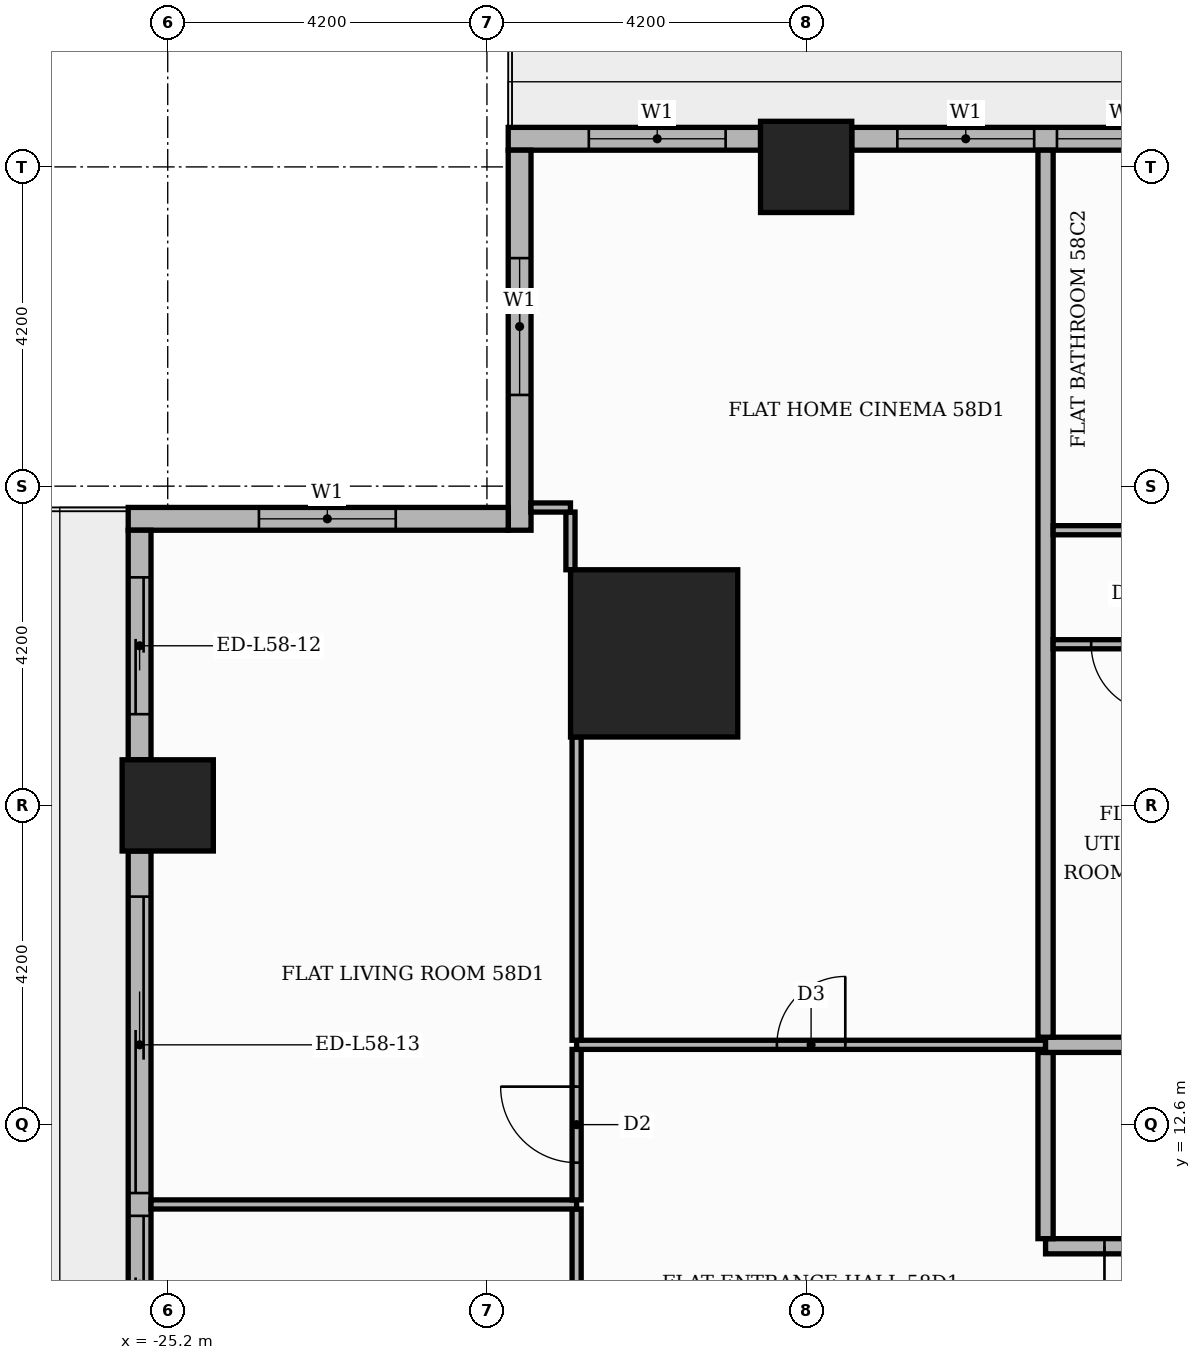
"""IFC4 building model, lengths in metres.
Left out: names, types, materials, properties, quantities, classifications, styles, units other than length and angle.
Written with IfcOpenShell. Run it as: python <this file> out.ifc"""

import sys

from ifc_helpers import new_model, si_unit, direction, frame, frame_2d, origin, origin_2d, place, context, subcontext, project, spatial, rectangle, extrude, element, fill, save


model = new_model("IFC4")
c1 = context("Model", 3, precision=1e-05, world=origin(), true_north=direction((0.0, 1.0)))
c2 = subcontext(c1, "Body", "Model", "MODEL_VIEW")
j1 = project(units=[si_unit("LENGTHUNIT", "METRE"), si_unit("PLANEANGLEUNIT", "RADIAN")], contexts=[c1])
p1 = place(None, origin())
s1 = spatial("IfcSite", under=j1, at=p1, CompositionType="ELEMENT")
p2 = place(p1, origin())
s2 = spatial("IfcBuilding", under=s1, at=p2, CompositionType="ELEMENT")
p3 = place(p2, frame((0.0, 0.0, 244.5)))
s3 = spatial("IfcBuildingStorey", under=s2, at=p3, CompositionType="ELEMENT", Elevation=244.5)
p4 = place(p3, frame((-18.8, 18.8, 0.0), z_axis=(0.0, 0.0, 1.0), x_axis=(1.0, 0.0, 0.0)))
e1 = element("IfcColumn", 1, at=p4, inside=s3, PredefinedType="COLUMN", context=c2, shape_type="SweptSolid", body=[
    extrude(rectangle(XDim=2.2, YDim=2.2, at=origin_2d()), origin(), (0.0, 0.0, 1.0), 3.9),
])
for number, where, z_axis, x_axis in (
    (2, (-16.8, 25.2, 0.0), (0.0, 0.0, 1.0), (1.0, 0.0, 0.0)),
    (3, (-25.2, 16.8, 0.0), (0.0, 0.0, 1.0), (1.0, 0.0, 0.0)),
):
    element("IfcColumn", number, at=place(p3, frame(where, z_axis=z_axis, x_axis=x_axis)), inside=s3, PredefinedType="COLUMN", context=c2, shape_type="SweptSolid", body=[
        extrude(rectangle(XDim=1.2, YDim=1.2, at=origin_2d()), origin(), (0.0, 0.0, 1.0), 3.9),
    ])
p5 = place(p3, frame((-9.0, 25.57, 0.0), z_axis=(0.0, 0.0, 1.0), x_axis=(-1.0, 0.0, 0.0)))
e4 = element("IfcWall", 4, at=p5, inside=s3, PredefinedType="STANDARD", context=c2, shape_type="SweptSolid", body=[
    extrude(rectangle(XDim=7.2, YDim=0.3, at=frame_2d((3.6, 0.0))), origin(), (0.0, 0.0, 1.0), 3.48),
])
p6 = place(p5, frame((0.6, 0.0, 0.9)))
e5 = element("IfcOpeningElement", 5, at=p6, cuts=e4, PredefinedType="OPENING", context=c2, shape_type="SweptSolid", body=[
    extrude(rectangle(XDim=1.8, YDim=2.1, at=frame_2d((0.9, 1.05))), frame((0.0, 0.16, 0.0), z_axis=(0.0, -1.0, 0.0), x_axis=(1.0, 0.0, 0.0)), (0.0, 0.0, 1.0), 0.32),
])
p7 = place(p5, frame((2.7, 0.0, 0.9)))
e6 = element("IfcOpeningElement", 6, at=p7, cuts=e4, PredefinedType="OPENING", context=c2, shape_type="SweptSolid", body=[
    extrude(rectangle(XDim=1.8, YDim=2.1, at=frame_2d((0.9, 1.05))), frame((0.0, 0.16, 0.0), z_axis=(0.0, -1.0, 0.0), x_axis=(1.0, 0.0, 0.0)), (0.0, 0.0, 1.0), 0.32),
])
p8 = place(p5, frame((4.8, 0.0, 0.9)))
e7 = element("IfcOpeningElement", 7, at=p8, cuts=e4, PredefinedType="OPENING", context=c2, shape_type="SweptSolid", body=[
    extrude(rectangle(XDim=1.8, YDim=2.1, at=frame_2d((0.9, 1.05))), frame((0.0, 0.16, 0.0), z_axis=(0.0, -1.0, 0.0), x_axis=(1.0, 0.0, 0.0)), (0.0, 0.0, 1.0), 0.32),
])
p9 = place(p3, frame((-17.4, 25.57, 0.0), z_axis=(0.0, 0.0, 1.0), x_axis=(-1.0, 0.0, 0.0)))
e8 = element("IfcWall", 8, at=p9, inside=s3, PredefinedType="STANDARD", context=c2, shape_type="SweptSolid", body=[
    extrude(rectangle(XDim=3.32, YDim=0.3, at=frame_2d((1.66, 0.0))), origin(), (0.0, 0.0, 1.0), 3.48),
])
p10 = place(p9, frame((0.459, 0.0, 0.9)))
e9 = element("IfcOpeningElement", 9, at=p10, cuts=e8, PredefinedType="OPENING", context=c2, shape_type="SweptSolid", body=[
    extrude(rectangle(XDim=1.8, YDim=2.1, at=frame_2d((0.9, 1.05))), frame((0.0, 0.16, 0.0), z_axis=(0.0, -1.0, 0.0), x_axis=(1.0, 0.0, 0.0)), (0.0, 0.0, 1.0), 0.32),
])
p11 = place(p3, frame((-20.57, 25.42, 0.0), z_axis=(0.0, 0.0, 1.0), x_axis=(0.0, -1.0, 0.0)))
e10 = element("IfcWall", 10, at=p11, inside=s3, PredefinedType="STANDARD", context=c2, shape_type="SweptSolid", body=[
    extrude(rectangle(XDim=5.0, YDim=0.3, at=frame_2d((2.5, 0.0))), origin(), (0.0, 0.0, 1.0), 3.48),
])
p12 = place(p11, frame((1.42, 0.0, 0.9)))
e11 = element("IfcOpeningElement", 11, at=p12, cuts=e10, PredefinedType="OPENING", context=c2, shape_type="SweptSolid", body=[
    extrude(rectangle(XDim=1.8, YDim=2.1, at=frame_2d((0.9, 1.05))), frame((0.0, 0.16, 0.0), z_axis=(0.0, -1.0, 0.0), x_axis=(1.0, 0.0, 0.0)), (0.0, 0.0, 1.0), 0.32),
])
p13 = place(p3, frame((-20.72, 20.57, 0.0), z_axis=(0.0, 0.0, 1.0), x_axis=(-1.0, 0.0, 0.0)))
e12 = element("IfcWall", 12, at=p13, inside=s3, PredefinedType="STANDARD", context=c2, shape_type="SweptSolid", body=[
    extrude(rectangle(XDim=5.0, YDim=0.3, at=frame_2d((2.5, 0.0))), origin(), (0.0, 0.0, 1.0), 3.48),
])
p14 = place(p13, frame((1.48, 0.0, 0.9)))
e13 = element("IfcOpeningElement", 13, at=p14, cuts=e12, PredefinedType="OPENING", context=c2, shape_type="SweptSolid", body=[
    extrude(rectangle(XDim=1.8, YDim=2.1, at=frame_2d((0.9, 1.05))), frame((0.0, 0.16, 0.0), z_axis=(0.0, -1.0, 0.0), x_axis=(1.0, 0.0, 0.0)), (0.0, 0.0, 1.0), 0.32),
])
p15 = place(p3, frame((-25.57, 20.42, 0.0), z_axis=(0.0, 0.0, 1.0), x_axis=(0.0, -1.0, 0.0)))
e14 = element("IfcWall", 14, at=p15, inside=s3, PredefinedType="STANDARD", context=c2, shape_type="SweptSolid", body=[
    extrude(rectangle(XDim=3.02, YDim=0.3, at=frame_2d((1.51, 0.0))), origin(), (0.0, 0.0, 1.0), 3.48),
])
p16 = place(p15, frame((0.62, 0.0, 0.0)))
e15 = element("IfcOpeningElement", 15, at=p16, cuts=e14, PredefinedType="OPENING", context=c2, shape_type="SweptSolid", body=[
    extrude(rectangle(XDim=1.8, YDim=2.4, at=frame_2d((0.9, 1.2))), frame((0.0, 0.16, 0.0), z_axis=(0.0, -1.0, 0.0), x_axis=(1.0, 0.0, 0.0)), (0.0, 0.0, 1.0), 0.32),
])
p17 = place(p3, frame((-25.57, 16.2, 0.0), z_axis=(0.0, 0.0, 1.0), x_axis=(0.0, -1.0, 0.0)))
e16 = element("IfcWall", 16, at=p17, inside=s3, PredefinedType="STANDARD", context=c2, shape_type="SweptSolid", body=[
    extrude(rectangle(XDim=7.2, YDim=0.3, at=frame_2d((3.6, 0.0))), origin(), (0.0, 0.0, 1.0), 3.48),
])
p18 = place(p17, frame((0.6, 0.0, 0.0)))
e17 = element("IfcOpeningElement", 17, at=p18, cuts=e16, PredefinedType="OPENING", context=c2, shape_type="SweptSolid", body=[
    extrude(rectangle(XDim=3.9, YDim=2.4, at=frame_2d((1.95, 1.2))), frame((0.0, 0.16, 0.0), z_axis=(0.0, -1.0, 0.0), x_axis=(1.0, 0.0, 0.0)), (0.0, 0.0, 1.0), 0.32),
])
p19 = place(p17, frame((4.8, 0.0, 0.0)))
e18 = element("IfcOpeningElement", 18, at=p19, cuts=e16, PredefinedType="OPENING", context=c2, shape_type="SweptSolid", body=[
    extrude(rectangle(XDim=1.8, YDim=2.4, at=frame_2d((0.9, 1.2))), frame((0.0, 0.16, 0.0), z_axis=(0.0, -1.0, 0.0), x_axis=(1.0, 0.0, 0.0)), (0.0, 0.0, 1.0), 0.32),
])
p20 = place(p3, frame((-19.82, 5.31, 0.0), z_axis=(0.0, 0.0, 1.0), x_axis=(0.0, 1.0, 0.0)))
e19 = element("IfcWall", 19, at=p20, inside=s3, PredefinedType="PARTITIONING", context=c2, shape_type="SweptSolid", body=[
    extrude(rectangle(XDim=6.18, YDim=0.12, at=frame_2d((3.09, 0.0))), origin(), (0.0, 0.0, 1.0), 3.48),
])
p21 = place(p20, frame((2.64, 0.0, 0.0)))
e20 = element("IfcOpeningElement", 20, at=p21, cuts=e19, PredefinedType="OPENING", context=c2, shape_type="SweptSolid", body=[
    extrude(rectangle(XDim=0.9, YDim=2.1, at=frame_2d((0.45, 1.05))), frame((0.0, 0.07, 0.0), z_axis=(0.0, -1.0, 0.0), x_axis=(1.0, 0.0, 0.0)), (0.0, 0.0, 1.0), 0.14),
])
p22 = place(p3, frame((-13.65, 11.0, 0.0), z_axis=(0.0, 0.0, 1.0), x_axis=(1.0, 0.0, 0.0)))
e21 = element("IfcWall", 21, at=p22, inside=s3, PredefinedType="PARTITIONING", context=c2, shape_type="SweptSolid", body=[
    extrude(rectangle(XDim=2.65, YDim=0.2, at=frame_2d((1.325, 0.0))), origin(), (0.0, 0.0, 1.0), 3.48),
])
p23 = place(p22, frame((0.775, 0.0, 0.0)))
e22 = element("IfcOpeningElement", 22, at=p23, cuts=e21, PredefinedType="OPENING", context=c2, shape_type="SweptSolid", body=[
    extrude(rectangle(XDim=1.1, YDim=2.4, at=frame_2d((0.55, 1.2))), frame((0.0, 0.11, 0.0), z_axis=(0.0, -1.0, 0.0), x_axis=(1.0, 0.0, 0.0)), (0.0, 0.0, 1.0), 0.22),
])
p24 = place(p3, frame((-13.65, 11.1, 0.0), z_axis=(0.0, 0.0, 1.0), x_axis=(0.0, 1.0, 0.0)))
e23 = element("IfcWall", 23, at=p24, inside=s3, PredefinedType="PARTITIONING", context=c2, shape_type="SweptSolid", body=[
    extrude(rectangle(XDim=2.45, YDim=0.2, at=frame_2d((1.225, 0.0))), origin(), (0.0, 0.0, 1.0), 3.48),
])
p25 = place(p3, frame((-25.42, 11.55, 0.0), z_axis=(0.0, 0.0, 1.0), x_axis=(1.0, 0.0, 0.0)))
e24 = element("IfcWall", 24, at=p25, inside=s3, PredefinedType="PARTITIONING", context=c2, shape_type="SweptSolid", body=[
    extrude(rectangle(XDim=5.6, YDim=0.12, at=frame_2d((2.8, 0.0))), origin(), (0.0, 0.0, 1.0), 3.48),
])
p26 = place(p3, frame((-19.82, 11.61, 0.0), z_axis=(0.0, 0.0, 1.0), x_axis=(0.0, 1.0, 0.0)))
e25 = element("IfcWall", 25, at=p26, inside=s3, PredefinedType="PARTITIONING", context=c2, shape_type="SweptSolid", body=[
    extrude(rectangle(XDim=1.98, YDim=0.12, at=frame_2d((0.99, 0.0))), origin(), (0.0, 0.0, 1.0), 3.48),
])
p27 = place(p26, frame((0.49, 0.0, 0.0)))
e26 = element("IfcOpeningElement", 26, at=p27, cuts=e25, PredefinedType="OPENING", context=c2, shape_type="SweptSolid", body=[
    extrude(rectangle(XDim=1.0, YDim=2.1, at=frame_2d((0.5, 1.05))), frame((0.0, 0.07, 0.0), z_axis=(0.0, -1.0, 0.0), x_axis=(1.0, 0.0, 0.0)), (0.0, 0.0, 1.0), 0.14),
])
p28 = place(p3, frame((-19.82, 13.65, 0.0), z_axis=(0.0, 0.0, 1.0), x_axis=(1.0, 0.0, 0.0)))
e27 = element("IfcWall", 27, at=p28, inside=s3, PredefinedType="PARTITIONING", context=c2, shape_type="SweptSolid", body=[
    extrude(rectangle(XDim=6.17, YDim=0.12, at=frame_2d((3.085, 0.0))), origin(), (0.0, 0.0, 1.0), 3.48),
])
p29 = place(p28, frame((2.635, 0.0, 0.0)))
e28 = element("IfcOpeningElement", 28, at=p29, cuts=e27, PredefinedType="OPENING", context=c2, shape_type="SweptSolid", body=[
    extrude(rectangle(XDim=0.9, YDim=2.1, at=frame_2d((0.45, 1.05))), frame((0.0, 0.07, 0.0), z_axis=(0.0, -1.0, 0.0), x_axis=(1.0, 0.0, 0.0)), (0.0, 0.0, 1.0), 0.14),
])
p30 = place(p3, frame((-13.65, 13.65, 0.0), z_axis=(0.0, 0.0, 1.0), x_axis=(1.0, 0.0, 0.0)))
e29 = element("IfcWall", 29, at=p30, inside=s3, PredefinedType="PARTITIONING", context=c2, shape_type="SweptSolid", body=[
    extrude(rectangle(XDim=39.07, YDim=0.2, at=frame_2d((19.535, 0.0))), origin(), (0.0, 0.0, 1.0), 3.48),
])
p31 = place(p30, frame((24.65, 0.0, 0.0)))
e30 = element("IfcOpeningElement", 30, at=p31, cuts=e29, PredefinedType="OPENING", context=c2, shape_type="SweptSolid", body=[
    extrude(rectangle(XDim=1.1, YDim=2.4, at=frame_2d((0.55, 1.2))), frame((0.0, 0.11, 0.0), z_axis=(0.0, -1.0, 0.0), x_axis=(1.0, 0.0, 0.0)), (0.0, 0.0, 1.0), 0.22),
])
p32 = place(p30, frame((12.05, 0.0, 0.0)))
e31 = element("IfcOpeningElement", 31, at=p32, cuts=e29, PredefinedType="OPENING", context=c2, shape_type="SweptSolid", body=[
    extrude(rectangle(XDim=1.1, YDim=2.4, at=frame_2d((0.55, 1.2))), frame((0.0, 0.11, 0.0), z_axis=(0.0, -1.0, 0.0), x_axis=(1.0, 0.0, 0.0)), (0.0, 0.0, 1.0), 0.22),
])
p33 = place(p3, frame((-19.82, 13.71, 0.0), z_axis=(0.0, 0.0, 1.0), x_axis=(0.0, 1.0, 0.0)))
e32 = element("IfcWall", 32, at=p33, inside=s3, PredefinedType="PARTITIONING", context=c2, shape_type="SweptSolid", body=[
    extrude(rectangle(XDim=3.99, YDim=0.12, at=frame_2d((1.995, 0.0))), origin(), (0.0, 0.0, 1.0), 3.48),
])
p34 = place(p3, frame((-13.65, 13.75, 0.0), z_axis=(0.0, 0.0, 1.0), x_axis=(0.0, 1.0, 0.0)))
e33 = element("IfcWall", 33, at=p34, inside=s3, PredefinedType="PARTITIONING", context=c2, shape_type="SweptSolid", body=[
    extrude(rectangle(XDim=11.67, YDim=0.2, at=frame_2d((5.835, 0.0))), origin(), (0.0, 0.0, 1.0), 3.48),
])
p35 = place(p3, frame((-13.55, 18.92, 0.0), z_axis=(0.0, 0.0, 1.0), x_axis=(1.0, 0.0, 0.0)))
e34 = element("IfcWall", 34, at=p35, inside=s3, PredefinedType="PARTITIONING", context=c2, shape_type="SweptSolid", body=[
    extrude(rectangle(XDim=10.4, YDim=0.12, at=frame_2d((5.2, 0.0))), origin(), (0.0, 0.0, 1.0), 3.48),
])
p36 = place(p35, frame((6.8, 0.0, 0.0)))
e35 = element("IfcOpeningElement", 35, at=p36, cuts=e34, PredefinedType="OPENING", context=c2, shape_type="SweptSolid", body=[
    extrude(rectangle(XDim=0.9, YDim=2.1, at=frame_2d((0.45, 1.05))), frame((0.0, 0.07, 0.0), z_axis=(0.0, -1.0, 0.0), x_axis=(1.0, 0.0, 0.0)), (0.0, 0.0, 1.0), 0.14),
])
p37 = place(p35, frame((2.6, 0.0, 0.0)))
e36 = element("IfcOpeningElement", 36, at=p37, cuts=e34, PredefinedType="OPENING", context=c2, shape_type="SweptSolid", body=[
    extrude(rectangle(XDim=0.9, YDim=2.1, at=frame_2d((0.45, 1.05))), frame((0.0, 0.07, 0.0), z_axis=(0.0, -1.0, 0.0), x_axis=(1.0, 0.0, 0.0)), (0.0, 0.0, 1.0), 0.14),
])
p38 = place(p35, frame((0.5, 0.0, 0.0)))
e37 = element("IfcOpeningElement", 37, at=p38, cuts=e34, PredefinedType="OPENING", context=c2, shape_type="SweptSolid", body=[
    extrude(rectangle(XDim=0.9, YDim=2.1, at=frame_2d((0.45, 1.05))), frame((0.0, 0.07, 0.0), z_axis=(0.0, -1.0, 0.0), x_axis=(1.0, 0.0, 0.0)), (0.0, 0.0, 1.0), 0.14),
])
p39 = place(p3, frame((-19.901, 19.9, 0.0), z_axis=(0.0, 0.0, 1.0), x_axis=(0.0, 1.0, 0.0)))
e38 = element("IfcWall", 38, at=p39, inside=s3, PredefinedType="PARTITIONING", context=c2, shape_type="SweptSolid", body=[
    extrude(rectangle(XDim=0.759, YDim=0.12, at=frame_2d((0.379, 0.0))), origin(), (0.0, 0.0, 1.0), 3.48),
])
p40 = place(p3, frame((-13.55, 20.42, 0.0), z_axis=(0.0, 0.0, 1.0), x_axis=(1.0, 0.0, 0.0)))
e39 = element("IfcWall", 39, at=p40, inside=s3, PredefinedType="PARTITIONING", context=c2, shape_type="SweptSolid", body=[
    extrude(rectangle(XDim=18.7, YDim=0.12, at=frame_2d((9.35, 0.0))), origin(), (0.0, 0.0, 1.0), 3.48),
])
p41 = place(p40, frame((16.2, 0.0, 0.0)))
e40 = element("IfcOpeningElement", 40, at=p41, cuts=e39, PredefinedType="OPENING", context=c2, shape_type="SweptSolid", body=[
    extrude(rectangle(XDim=1.0, YDim=2.1, at=frame_2d((0.5, 1.05))), frame((0.0, 0.07, 0.0), z_axis=(0.0, -1.0, 0.0), x_axis=(1.0, 0.0, 0.0)), (0.0, 0.0, 1.0), 0.14),
])
p42 = place(p40, frame((12.05, 0.0, 0.0)))
e41 = element("IfcOpeningElement", 41, at=p42, cuts=e39, PredefinedType="OPENING", context=c2, shape_type="SweptSolid", body=[
    extrude(rectangle(XDim=0.9, YDim=2.1, at=frame_2d((0.45, 1.05))), frame((0.0, 0.07, 0.0), z_axis=(0.0, -1.0, 0.0), x_axis=(1.0, 0.0, 0.0)), (0.0, 0.0, 1.0), 0.14),
])
p43 = place(p40, frame((3.65, 0.0, 0.0)))
e42 = element("IfcOpeningElement", 42, at=p43, cuts=e39, PredefinedType="OPENING", context=c2, shape_type="SweptSolid", body=[
    extrude(rectangle(XDim=0.9, YDim=2.1, at=frame_2d((0.45, 1.05))), frame((0.0, 0.07, 0.0), z_axis=(0.0, -1.0, 0.0), x_axis=(1.0, 0.0, 0.0)), (0.0, 0.0, 1.0), 0.14),
])
p44 = place(p3, frame((-20.421, 20.719, 0.0), z_axis=(0.0, 0.0, 1.0), x_axis=(1.0, 0.0, 0.0)))
e43 = element("IfcWall", 43, at=p44, inside=s3, PredefinedType="PARTITIONING", context=c2, shape_type="SweptSolid", body=[
    extrude(rectangle(XDim=0.52, YDim=0.12, at=frame_2d((0.26, 0.0))), origin(), (0.0, 0.0, 1.0), 3.48),
])
p45 = place(p7, origin())
e44 = element("IfcWindow", 44, at=p45, inside=s3, PartitioningType="SINGLE_PANEL", PredefinedType="WINDOW", context=c2, shape_type="SweptSolid", body=[
    extrude(rectangle(XDim=1.8, YDim=2.1, at=frame_2d((0.9, 1.05))), frame((0.0, 0.03, 0.0), z_axis=(0.0, -1.0, 0.0), x_axis=(1.0, 0.0, 0.0)), (0.0, 0.0, 1.0), 0.06),
])
fill(e6, e44)
p46 = place(p8, origin())
e45 = element("IfcWindow", 45, at=p46, inside=s3, PartitioningType="SINGLE_PANEL", PredefinedType="WINDOW", context=c2, shape_type="SweptSolid", body=[
    extrude(rectangle(XDim=1.8, YDim=2.1, at=frame_2d((0.9, 1.05))), frame((0.0, 0.03, 0.0), z_axis=(0.0, -1.0, 0.0), x_axis=(1.0, 0.0, 0.0)), (0.0, 0.0, 1.0), 0.06),
])
fill(e7, e45)
p47 = place(p10, origin())
e46 = element("IfcWindow", 46, at=p47, inside=s3, PartitioningType="SINGLE_PANEL", PredefinedType="WINDOW", context=c2, shape_type="SweptSolid", body=[
    extrude(rectangle(XDim=1.8, YDim=2.1, at=frame_2d((0.9, 1.05))), frame((0.0, 0.03, 0.0), z_axis=(0.0, -1.0, 0.0), x_axis=(1.0, 0.0, 0.0)), (0.0, 0.0, 1.0), 0.06),
])
fill(e9, e46)
p48 = place(p12, origin())
e47 = element("IfcWindow", 47, at=p48, inside=s3, PartitioningType="SINGLE_PANEL", PredefinedType="WINDOW", context=c2, shape_type="SweptSolid", body=[
    extrude(rectangle(XDim=1.8, YDim=2.1, at=frame_2d((0.9, 1.05))), frame((0.0, 0.03, 0.0), z_axis=(0.0, -1.0, 0.0), x_axis=(1.0, 0.0, 0.0)), (0.0, 0.0, 1.0), 0.06),
])
fill(e11, e47)
p49 = place(p14, origin())
e48 = element("IfcWindow", 48, at=p49, inside=s3, PartitioningType="SINGLE_PANEL", PredefinedType="WINDOW", context=c2, shape_type="SweptSolid", body=[
    extrude(rectangle(XDim=1.8, YDim=2.1, at=frame_2d((0.9, 1.05))), frame((0.0, 0.03, 0.0), z_axis=(0.0, -1.0, 0.0), x_axis=(1.0, 0.0, 0.0)), (0.0, 0.0, 1.0), 0.06),
])
fill(e13, e48)
p50 = place(p16, origin())
e49 = element("IfcDoor", 49, at=p50, inside=s3, OperationType="SLIDING_TO_RIGHT", PredefinedType="DOOR", context=c2, shape_type="SweptSolid", body=[
    extrude(rectangle(XDim=1.8, YDim=2.4, at=frame_2d((0.9, 1.2))), frame((0.0, 0.025, 0.0), z_axis=(0.0, -1.0, 0.0), x_axis=(1.0, 0.0, 0.0)), (0.0, 0.0, 1.0), 0.05),
])
fill(e15, e49)
p51 = place(p18, origin())
e50 = element("IfcDoor", 50, at=p51, inside=s3, OperationType="SLIDING_TO_LEFT", PredefinedType="DOOR", context=c2, shape_type="SweptSolid", body=[
    extrude(rectangle(XDim=3.9, YDim=2.4, at=frame_2d((1.95, 1.2))), frame((0.0, 0.025, 0.0), z_axis=(0.0, -1.0, 0.0), x_axis=(1.0, 0.0, 0.0)), (0.0, 0.0, 1.0), 0.05),
])
fill(e17, e50)
p52 = place(p19, origin())
e51 = element("IfcDoor", 51, at=p52, inside=s3, OperationType="SLIDING_TO_RIGHT", PredefinedType="DOOR", context=c2, shape_type="SweptSolid", body=[
    extrude(rectangle(XDim=1.8, YDim=2.4, at=frame_2d((0.9, 1.2))), frame((0.0, 0.025, 0.0), z_axis=(0.0, -1.0, 0.0), x_axis=(1.0, 0.0, 0.0)), (0.0, 0.0, 1.0), 0.05),
])
fill(e18, e51)
p53 = place(p38, frame((0.9, 0.0, 0.0), z_axis=(0.0, 0.0, 1.0), x_axis=(-1.0, 0.0, 0.0)))
e52 = element("IfcDoor", 52, at=p53, inside=s3, OperationType="SINGLE_SWING_RIGHT", PredefinedType="DOOR", context=c2, shape_type="SweptSolid", body=[
    extrude(rectangle(XDim=0.9, YDim=2.1, at=frame_2d((0.45, 1.05))), frame((0.0, 0.025, 0.0), z_axis=(0.0, -1.0, 0.0), x_axis=(1.0, 0.0, 0.0)), (0.0, 0.0, 1.0), 0.05),
])
fill(e37, e52)
p54 = place(p23, frame((1.1, 0.0, 0.0), z_axis=(0.0, 0.0, 1.0), x_axis=(-1.0, 0.0, 0.0)))
e53 = element("IfcDoor", 53, at=p54, inside=s3, OperationType="SINGLE_SWING_LEFT", PredefinedType="DOOR", context=c2, shape_type="SweptSolid", body=[
    extrude(rectangle(XDim=1.1, YDim=2.4, at=frame_2d((0.55, 1.2))), frame((0.0, 0.025, 0.0), z_axis=(0.0, -1.0, 0.0), x_axis=(1.0, 0.0, 0.0)), (0.0, 0.0, 1.0), 0.05),
])
fill(e22, e53)
p55 = place(p29, origin())
e54 = element("IfcDoor", 54, at=p55, inside=s3, OperationType="SINGLE_SWING_RIGHT", PredefinedType="DOOR", context=c2, shape_type="SweptSolid", body=[
    extrude(rectangle(XDim=0.9, YDim=2.1, at=frame_2d((0.45, 1.05))), frame((0.0, 0.025, 0.0), z_axis=(0.0, -1.0, 0.0), x_axis=(1.0, 0.0, 0.0)), (0.0, 0.0, 1.0), 0.05),
])
fill(e28, e54)
p56 = place(p27, origin())
e55 = element("IfcDoor", 55, at=p56, inside=s3, OperationType="SINGLE_SWING_RIGHT", PredefinedType="DOOR", context=c2, shape_type="SweptSolid", body=[
    extrude(rectangle(XDim=1.0, YDim=2.1, at=frame_2d((0.5, 1.05))), frame((0.0, 0.025, 0.0), z_axis=(0.0, -1.0, 0.0), x_axis=(1.0, 0.0, 0.0)), (0.0, 0.0, 1.0), 0.05),
])
fill(e26, e55)
save(model, sys.argv[1])
